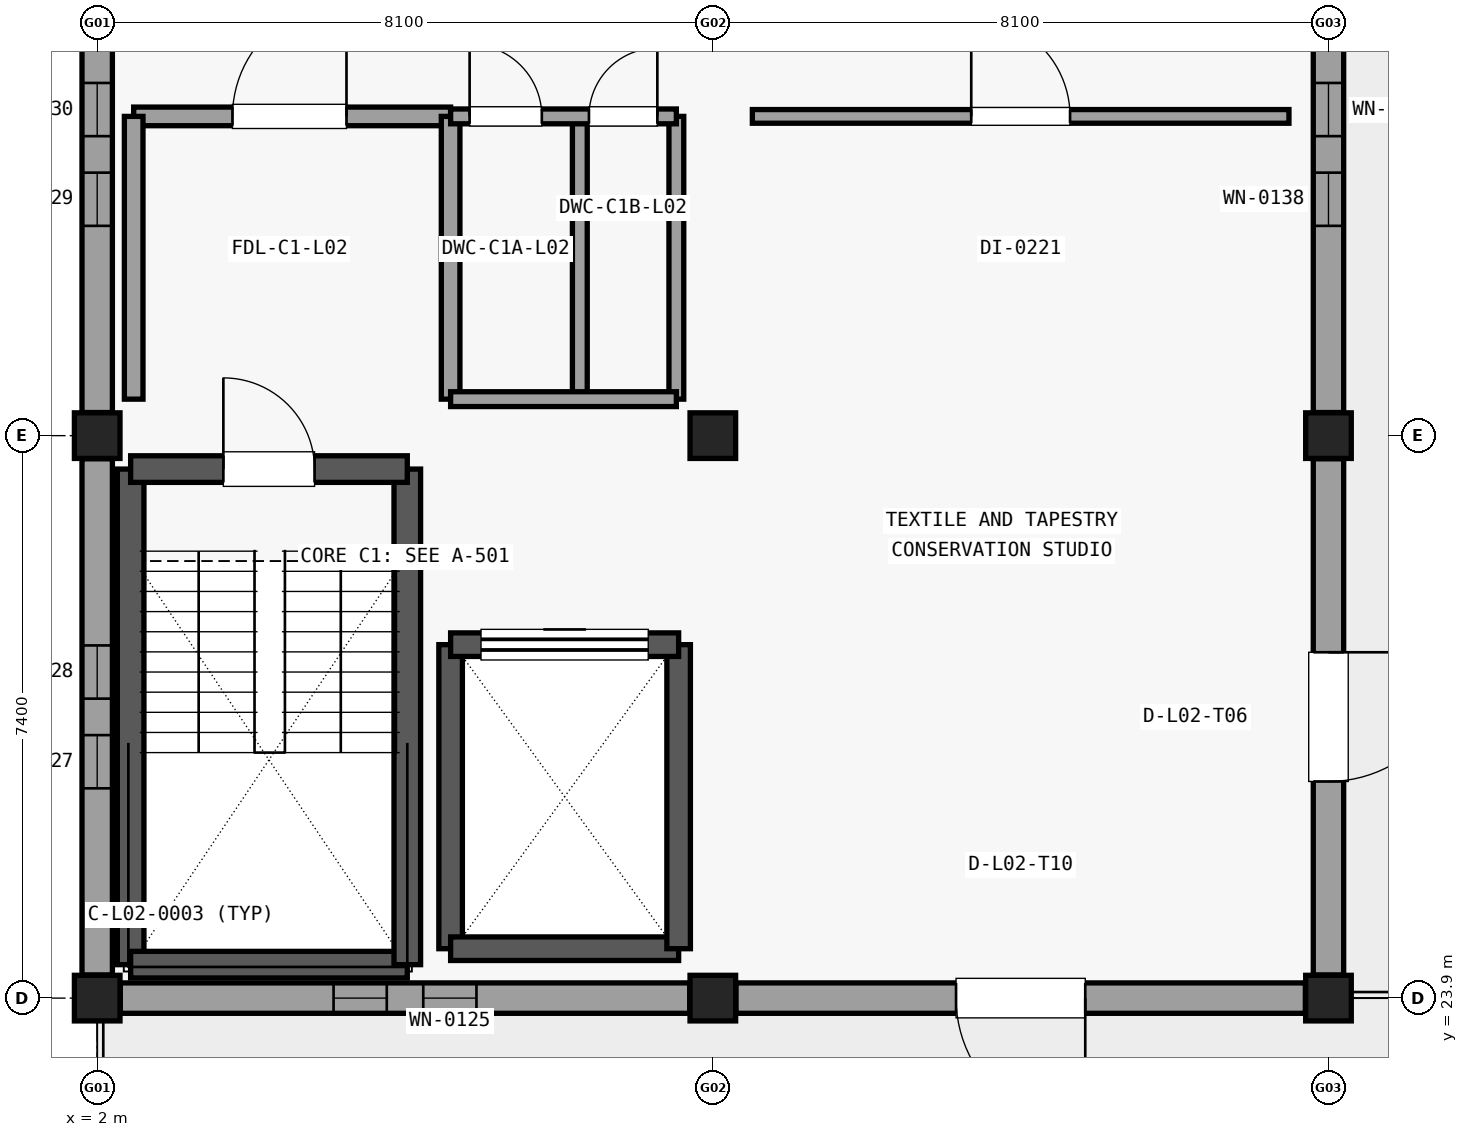
"""IFC4 building model, lengths in metres.
Left out: names, types, materials, properties, quantities, classifications, styles, units other than length and angle.
Written with IfcOpenShell. Run it as: python <this file> out.ifc"""

import sys

from ifc_helpers import new_model, si_unit, direction, frame, frame_2d, origin, origin_2d, place, context, subcontext, project, spatial, rectangle, extrude, element, fill, save


model = new_model("IFC4")
c1 = context("Model", 3, precision=1e-05, world=origin(), true_north=direction((0.0, 1.0)))
c2 = subcontext(c1, "Body", "Model", "MODEL_VIEW")
j1 = project(units=[si_unit("LENGTHUNIT", "METRE"), si_unit("PLANEANGLEUNIT", "RADIAN")], contexts=[c1])
p1 = place(None, origin())
s1 = spatial("IfcSite", under=j1, at=p1, CompositionType="ELEMENT")
p2 = place(p1, origin())
s2 = spatial("IfcBuilding", under=s1, at=p2, CompositionType="ELEMENT")
p3 = place(p2, frame((0.0, 0.0, 10.2)))
s3 = spatial("IfcBuildingStorey", under=s2, at=p3, CompositionType="ELEMENT", Elevation=10.2)
for number, where, z_axis, x_axis in (
    (1, (2.0, 23.9, 0.0), (0.0, 0.0, 1.0), (1.0, 0.0, 0.0)),
    (2, (2.0, 31.3, 0.0), (0.0, 0.0, 1.0), (1.0, 0.0, 0.0)),
    (3, (10.1, 23.9, 0.0), (0.0, 0.0, 1.0), (1.0, 0.0, 0.0)),
    (4, (10.1, 31.3, 0.0), (0.0, 0.0, 1.0), (1.0, 0.0, 0.0)),
    (5, (18.2, 23.9, 0.0), (0.0, 0.0, 1.0), (1.0, 0.0, 0.0)),
    (6, (18.2, 31.3, 0.0), (0.0, 0.0, 1.0), (1.0, 0.0, 0.0)),
):
    element("IfcColumn", number, at=place(p3, frame(where, z_axis=z_axis, x_axis=x_axis)), inside=s3, PredefinedType="COLUMN", context=c2, shape_type="SweptSolid", body=[
        extrude(rectangle(XDim=0.6, YDim=0.6, at=origin_2d()), origin(), (0.0, 0.0, 1.0), 3.37),
    ])
p4 = place(p3, frame((9.796, 23.9, 0.0), z_axis=(0.0, 0.0, 1.0), x_axis=(-1.0, 0.0, 0.0)))
e7 = element("IfcWall", 7, at=p4, inside=s3, PredefinedType="SOLIDWALL", context=c2, shape_type="SweptSolid", body=[
    extrude(rectangle(XDim=7.492, YDim=0.4, at=frame_2d((3.746, 0.0))), origin(), (0.0, 0.0, 1.0), 2.898),
])
p5 = place(p4, frame((2.806, 0.0, 0.6)))
e8 = element("IfcOpeningElement", 8, at=p5, cuts=e7, PredefinedType="OPENING", context=c2, shape_type="SweptSolid", body=[
    extrude(rectangle(XDim=0.7, YDim=1.86, at=frame_2d((0.35, 0.93))), frame((0.0, 0.21, 0.0), z_axis=(0.0, -1.0, 0.0), x_axis=(1.0, 0.0, 0.0)), (0.0, 0.0, 1.0), 0.42),
])
p6 = place(p4, frame((3.986, 0.0, 0.6)))
e9 = element("IfcOpeningElement", 9, at=p6, cuts=e7, PredefinedType="OPENING", context=c2, shape_type="SweptSolid", body=[
    extrude(rectangle(XDim=0.7, YDim=1.86, at=frame_2d((0.35, 0.93))), frame((0.0, 0.21, 0.0), z_axis=(0.0, -1.0, 0.0), x_axis=(1.0, 0.0, 0.0)), (0.0, 0.0, 1.0), 0.42),
])
p7 = place(p3, frame((2.0, 24.204, 0.0), z_axis=(0.0, 0.0, 1.0), x_axis=(0.0, 1.0, 0.0)))
e10 = element("IfcWall", 10, at=p7, inside=s3, PredefinedType="SOLIDWALL", context=c2, shape_type="SweptSolid", body=[
    extrude(rectangle(XDim=6.792, YDim=0.4, at=frame_2d((3.396, 0.0))), origin(), (0.0, 0.0, 1.0), 2.898),
])
p8 = place(p7, frame((2.456, 0.0, 0.6)))
e11 = element("IfcOpeningElement", 11, at=p8, cuts=e10, PredefinedType="OPENING", context=c2, shape_type="SweptSolid", body=[
    extrude(rectangle(XDim=0.7, YDim=1.86, at=frame_2d((0.35, 0.93))), frame((0.0, 0.21, 0.0), z_axis=(0.0, -1.0, 0.0), x_axis=(1.0, 0.0, 0.0)), (0.0, 0.0, 1.0), 0.42),
])
p9 = place(p7, frame((3.636, 0.0, 0.6)))
e12 = element("IfcOpeningElement", 12, at=p9, cuts=e10, PredefinedType="OPENING", context=c2, shape_type="SweptSolid", body=[
    extrude(rectangle(XDim=0.7, YDim=1.86, at=frame_2d((0.35, 0.93))), frame((0.0, 0.21, 0.0), z_axis=(0.0, -1.0, 0.0), x_axis=(1.0, 0.0, 0.0)), (0.0, 0.0, 1.0), 0.42),
])
p10 = place(p3, frame((2.0, 31.604, 0.0), z_axis=(0.0, 0.0, 1.0), x_axis=(0.0, 1.0, 0.0)))
e13 = element("IfcWall", 13, at=p10, inside=s3, PredefinedType="SOLIDWALL", context=c2, shape_type="SweptSolid", body=[
    extrude(rectangle(XDim=6.792, YDim=0.4, at=frame_2d((3.396, 0.0))), origin(), (0.0, 0.0, 1.0), 2.898),
])
p11 = place(p10, frame((2.456, 0.0, 0.6)))
e14 = element("IfcOpeningElement", 14, at=p11, cuts=e13, PredefinedType="OPENING", context=c2, shape_type="SweptSolid", body=[
    extrude(rectangle(XDim=0.7, YDim=1.86, at=frame_2d((0.35, 0.93))), frame((0.0, 0.21, 0.0), z_axis=(0.0, -1.0, 0.0), x_axis=(1.0, 0.0, 0.0)), (0.0, 0.0, 1.0), 0.42),
])
p12 = place(p10, frame((3.636, 0.0, 0.6)))
e15 = element("IfcOpeningElement", 15, at=p12, cuts=e13, PredefinedType="OPENING", context=c2, shape_type="SweptSolid", body=[
    extrude(rectangle(XDim=0.7, YDim=1.86, at=frame_2d((0.35, 0.93))), frame((0.0, 0.21, 0.0), z_axis=(0.0, -1.0, 0.0), x_axis=(1.0, 0.0, 0.0)), (0.0, 0.0, 1.0), 0.42),
])
p13 = place(p3, frame((17.896, 23.9, 0.0), z_axis=(0.0, 0.0, 1.0), x_axis=(-1.0, 0.0, 0.0)))
e16 = element("IfcWall", 16, at=p13, inside=s3, PredefinedType="SOLIDWALL", context=c2, shape_type="SweptSolid", body=[
    extrude(rectangle(XDim=7.492, YDim=0.4, at=frame_2d((3.746, 0.0))), origin(), (0.0, 0.0, 1.0), 2.898),
])
p14 = place(p13, frame((2.896, 0.0, 0.0)))
e17 = element("IfcOpeningElement", 17, at=p14, cuts=e16, PredefinedType="OPENING", context=c2, shape_type="SweptSolid", body=[
    extrude(rectangle(XDim=1.7, YDim=2.15, at=frame_2d((0.85, 1.075))), frame((0.0, 0.21, 0.0), z_axis=(0.0, -1.0, 0.0), x_axis=(1.0, 0.0, 0.0)), (0.0, 0.0, 1.0), 0.42),
])
p15 = place(p3, frame((18.2, 30.996, 0.0), z_axis=(0.0, 0.0, 1.0), x_axis=(0.0, -1.0, 0.0)))
e18 = element("IfcWall", 18, at=p15, inside=s3, PredefinedType="SOLIDWALL", context=c2, shape_type="SweptSolid", body=[
    extrude(rectangle(XDim=6.792, YDim=0.4, at=frame_2d((3.396, 0.0))), origin(), (0.0, 0.0, 1.0), 2.898),
])
p16 = place(p15, frame((2.546, 0.0, 0.0)))
e19 = element("IfcOpeningElement", 19, at=p16, cuts=e18, PredefinedType="OPENING", context=c2, shape_type="SweptSolid", body=[
    extrude(rectangle(XDim=1.7, YDim=2.15, at=frame_2d((0.85, 1.075))), frame((0.0, 0.21, 0.0), z_axis=(0.0, -1.0, 0.0), x_axis=(1.0, 0.0, 0.0)), (0.0, 0.0, 1.0), 0.42),
])
p17 = place(p3, frame((18.2, 38.396, 0.0), z_axis=(0.0, 0.0, 1.0), x_axis=(0.0, -1.0, 0.0)))
e20 = element("IfcWall", 20, at=p17, inside=s3, PredefinedType="SOLIDWALL", context=c2, shape_type="SweptSolid", body=[
    extrude(rectangle(XDim=6.792, YDim=0.4, at=frame_2d((3.396, 0.0))), origin(), (0.0, 0.0, 1.0), 2.898),
])
p18 = place(p17, frame((2.456, 0.0, 0.6)))
e21 = element("IfcOpeningElement", 21, at=p18, cuts=e20, PredefinedType="OPENING", context=c2, shape_type="SweptSolid", body=[
    extrude(rectangle(XDim=0.7, YDim=1.86, at=frame_2d((0.35, 0.93))), frame((0.0, 0.21, 0.0), z_axis=(0.0, -1.0, 0.0), x_axis=(1.0, 0.0, 0.0)), (0.0, 0.0, 1.0), 0.42),
])
p19 = place(p17, frame((3.636, 0.0, 0.6)))
e22 = element("IfcOpeningElement", 22, at=p19, cuts=e20, PredefinedType="OPENING", context=c2, shape_type="SweptSolid", body=[
    extrude(rectangle(XDim=0.7, YDim=1.86, at=frame_2d((0.35, 0.93))), frame((0.0, 0.21, 0.0), z_axis=(0.0, -1.0, 0.0), x_axis=(1.0, 0.0, 0.0)), (0.0, 0.0, 1.0), 0.42),
])
p20 = place(p3, frame((2.44, 24.34, 0.0), z_axis=(0.0, 0.0, 1.0), x_axis=(0.0, 1.0, 0.0)))
e23 = element("IfcWall", 23, at=p20, inside=s3, PredefinedType="SHEAR", context=c2, shape_type="SweptSolid", body=[
    extrude(rectangle(XDim=6.52, YDim=0.35, at=frame_2d((3.26, 0.0))), origin(), (0.0, 0.0, 1.0), 3.365),
])
p21 = place(p3, frame((2.44, 24.34, 0.0), z_axis=(0.0, 0.0, 1.0), x_axis=(1.0, 0.0, 0.0)))
e24 = element("IfcWall", 24, at=p21, inside=s3, PredefinedType="SHEAR", context=c2, shape_type="SweptSolid", body=[
    extrude(rectangle(XDim=3.64, YDim=0.35, at=frame_2d((1.82, 0.0))), origin(), (0.0, 0.0, 1.0), 3.365),
])
p22 = place(p3, frame((6.08, 24.34, 0.0), z_axis=(0.0, 0.0, 1.0), x_axis=(0.0, 1.0, 0.0)))
e25 = element("IfcWall", 25, at=p22, inside=s3, PredefinedType="SHEAR", context=c2, shape_type="SweptSolid", body=[
    extrude(rectangle(XDim=6.52, YDim=0.35, at=frame_2d((3.26, 0.0))), origin(), (0.0, 0.0, 1.0), 3.365),
])
p23 = place(p3, frame((2.44, 30.86, 0.0), z_axis=(0.0, 0.0, 1.0), x_axis=(1.0, 0.0, 0.0)))
e26 = element("IfcWall", 26, at=p23, inside=s3, PredefinedType="SHEAR", context=c2, shape_type="SweptSolid", body=[
    extrude(rectangle(XDim=3.64, YDim=0.35, at=frame_2d((1.82, 0.0))), origin(), (0.0, 0.0, 1.0), 3.365),
])
p24 = place(p23, frame((1.22, 0.0, 0.0)))
e27 = element("IfcOpeningElement", 27, at=p24, cuts=e26, PredefinedType="OPENING", context=c2, shape_type="SweptSolid", body=[
    extrude(rectangle(XDim=1.2, YDim=2.15, at=frame_2d((0.6, 1.075))), frame((0.0, 0.185, 0.0), z_axis=(0.0, -1.0, 0.0), x_axis=(1.0, 0.0, 0.0)), (0.0, 0.0, 1.0), 0.37),
])
p25 = place(p3, frame((6.65, 24.55, 0.0), z_axis=(0.0, 0.0, 1.0), x_axis=(0.0, 1.0, 0.0)))
e28 = element("IfcWall", 28, at=p25, inside=s3, PredefinedType="SHEAR", context=c2, shape_type="SweptSolid", body=[
    extrude(rectangle(XDim=4.0, YDim=0.31, at=frame_2d((2.0, 0.0))), origin(), (0.0, 0.0, 1.0), 3.365),
])
p26 = place(p3, frame((6.65, 24.55, 0.0), z_axis=(0.0, 0.0, 1.0), x_axis=(1.0, 0.0, 0.0)))
e29 = element("IfcWall", 29, at=p26, inside=s3, PredefinedType="SHEAR", context=c2, shape_type="SweptSolid", body=[
    extrude(rectangle(XDim=3.0, YDim=0.31, at=frame_2d((1.5, 0.0))), origin(), (0.0, 0.0, 1.0), 3.365),
])
p27 = place(p3, frame((9.65, 24.55, 0.0), z_axis=(0.0, 0.0, 1.0), x_axis=(0.0, 1.0, 0.0)))
e30 = element("IfcWall", 30, at=p27, inside=s3, PredefinedType="SHEAR", context=c2, shape_type="SweptSolid", body=[
    extrude(rectangle(XDim=4.0, YDim=0.31, at=frame_2d((2.0, 0.0))), origin(), (0.0, 0.0, 1.0), 3.365),
])
p28 = place(p3, frame((6.65, 28.55, 0.0), z_axis=(0.0, 0.0, 1.0), x_axis=(1.0, 0.0, 0.0)))
e31 = element("IfcWall", 31, at=p28, inside=s3, PredefinedType="SHEAR", context=c2, shape_type="SweptSolid", body=[
    extrude(rectangle(XDim=3.0, YDim=0.31, at=frame_2d((1.5, 0.0))), origin(), (0.0, 0.0, 1.0), 3.365),
])
p29 = place(p28, frame((0.4, 0.0, 0.0)))
e32 = element("IfcOpeningElement", 32, at=p29, cuts=e31, PredefinedType="OPENING", context=c2, shape_type="SweptSolid", body=[
    extrude(rectangle(XDim=2.2, YDim=2.55, at=frame_2d((1.1, 1.275))), frame((0.0, 0.165, 0.0), z_axis=(0.0, -1.0, 0.0), x_axis=(1.0, 0.0, 0.0)), (0.0, 0.0, 1.0), 0.33),
])
p30 = place(p3, frame((2.48, 35.5, 0.0), z_axis=(0.0, 0.0, 1.0), x_axis=(1.0, 0.0, 0.0)))
e33 = element("IfcWall", 33, at=p30, inside=s3, PredefinedType="PARTITIONING", context=c2, shape_type="SweptSolid", body=[
    extrude(rectangle(XDim=4.17, YDim=0.245, at=frame_2d((2.085, 0.0))), origin(), (0.0, 0.0, 1.0), 2.903),
])
p31 = place(p30, frame((1.3, 0.0, 0.0)))
e34 = element("IfcOpeningElement", 34, at=p31, cuts=e33, PredefinedType="OPENING", context=c2, shape_type="SweptSolid", body=[
    extrude(rectangle(XDim=1.5, YDim=2.15, at=frame_2d((0.75, 1.075))), frame((0.0, 0.133, 0.0), z_axis=(0.0, -1.0, 0.0), x_axis=(1.0, 0.0, 0.0)), (0.0, 0.0, 1.0), 0.265),
])
for number, where, z_axis, x_axis in (
    (35, (2.48, 31.78, 0.0), (0.0, 0.0, 1.0), (0.0, 1.0, 0.0)),
    (36, (6.65, 31.78, 0.0), (0.0, 0.0, 1.0), (0.0, 1.0, 0.0)),
):
    element("IfcWall", number, at=place(p3, frame(where, z_axis=z_axis, x_axis=x_axis)), inside=s3, PredefinedType="PARTITIONING", context=c2, shape_type="SweptSolid", body=[
        extrude(rectangle(XDim=3.72, YDim=0.245, at=frame_2d((1.86, 0.0))), origin(), (0.0, 0.0, 1.0), 2.903),
    ])
for number, where, z_axis, x_axis in (
    (37, (8.35, 31.78, 0.0), (0.0, 0.0, 1.0), (0.0, 1.0, 0.0)),
    (38, (9.62, 31.78, 0.0), (0.0, 0.0, 1.0), (0.0, 1.0, 0.0)),
):
    element("IfcWall", number, at=place(p3, frame(where, z_axis=z_axis, x_axis=x_axis)), inside=s3, PredefinedType="PARTITIONING", context=c2, shape_type="SweptSolid", body=[
        extrude(rectangle(XDim=3.72, YDim=0.195, at=frame_2d((1.86, 0.0))), origin(), (0.0, 0.0, 1.0), 2.903),
    ])
p32 = place(p3, frame((6.65, 31.78, 0.0), z_axis=(0.0, 0.0, 1.0), x_axis=(1.0, 0.0, 0.0)))
e39 = element("IfcWall", 39, at=p32, inside=s3, PredefinedType="PARTITIONING", context=c2, shape_type="SweptSolid", body=[
    extrude(rectangle(XDim=2.97, YDim=0.195, at=frame_2d((1.485, 0.0))), origin(), (0.0, 0.0, 1.0), 2.903),
])
p33 = place(p3, frame((6.65, 35.5, 0.0), z_axis=(0.0, 0.0, 1.0), x_axis=(1.0, 0.0, 0.0)))
e40 = element("IfcWall", 40, at=p33, inside=s3, PredefinedType="PARTITIONING", context=c2, shape_type="SweptSolid", body=[
    extrude(rectangle(XDim=2.97, YDim=0.195, at=frame_2d((1.485, 0.0))), origin(), (0.0, 0.0, 1.0), 2.903),
])
p34 = place(p33, frame((0.25, 0.0, 0.0)))
e41 = element("IfcOpeningElement", 41, at=p34, cuts=e40, PredefinedType="OPENING", context=c2, shape_type="SweptSolid", body=[
    extrude(rectangle(XDim=0.95, YDim=2.1, at=frame_2d((0.475, 1.05))), frame((0.0, 0.107, 0.0), z_axis=(0.0, -1.0, 0.0), x_axis=(1.0, 0.0, 0.0)), (0.0, 0.0, 1.0), 0.215),
])
p35 = place(p33, frame((1.82, 0.0, 0.0)))
e42 = element("IfcOpeningElement", 42, at=p35, cuts=e40, PredefinedType="OPENING", context=c2, shape_type="SweptSolid", body=[
    extrude(rectangle(XDim=0.9, YDim=2.1, at=frame_2d((0.45, 1.05))), frame((0.0, 0.107, 0.0), z_axis=(0.0, -1.0, 0.0), x_axis=(1.0, 0.0, 0.0)), (0.0, 0.0, 1.0), 0.215),
])
p36 = place(p3, frame((10.62, 35.5, 0.0), z_axis=(0.0, 0.0, 1.0), x_axis=(1.0, 0.0, 0.0)))
e43 = element("IfcWall", 43, at=p36, inside=s3, PredefinedType="PARTITIONING", context=c2, shape_type="SweptSolid", body=[
    extrude(rectangle(XDim=7.06, YDim=0.18, at=frame_2d((3.53, 0.0))), origin(), (0.0, 0.0, 1.0), 2.903),
])
p37 = place(p36, frame((2.88, 0.0, 0.0)))
e44 = element("IfcOpeningElement", 44, at=p37, cuts=e43, PredefinedType="OPENING", context=c2, shape_type="SweptSolid", body=[
    extrude(rectangle(XDim=1.3, YDim=2.2, at=frame_2d((0.65, 1.1))), frame((0.0, 0.1, 0.0), z_axis=(0.0, -1.0, 0.0), x_axis=(1.0, 0.0, 0.0)), (0.0, 0.0, 1.0), 0.2),
])
p38 = place(p5, origin())
e45 = element("IfcWindow", 45, at=p38, inside=s3, PartitioningType="SINGLE_PANEL", PredefinedType="WINDOW", context=c2, shape_type="SweptSolid", body=[
    extrude(rectangle(XDim=0.7, YDim=1.86, at=frame_2d((0.35, 0.93))), frame((0.0, 0.03, 0.0), z_axis=(0.0, -1.0, 0.0), x_axis=(1.0, 0.0, 0.0)), (0.0, 0.0, 1.0), 0.06),
])
fill(e8, e45)
p39 = place(p6, origin())
e46 = element("IfcWindow", 46, at=p39, inside=s3, PartitioningType="SINGLE_PANEL", PredefinedType="WINDOW", context=c2, shape_type="SweptSolid", body=[
    extrude(rectangle(XDim=0.7, YDim=1.86, at=frame_2d((0.35, 0.93))), frame((0.0, 0.03, 0.0), z_axis=(0.0, -1.0, 0.0), x_axis=(1.0, 0.0, 0.0)), (0.0, 0.0, 1.0), 0.06),
])
fill(e9, e46)
p40 = place(p8, origin())
e47 = element("IfcWindow", 47, at=p40, inside=s3, PartitioningType="SINGLE_PANEL", PredefinedType="WINDOW", context=c2, shape_type="SweptSolid", body=[
    extrude(rectangle(XDim=0.7, YDim=1.86, at=frame_2d((0.35, 0.93))), frame((0.0, 0.03, 0.0), z_axis=(0.0, -1.0, 0.0), x_axis=(1.0, 0.0, 0.0)), (0.0, 0.0, 1.0), 0.06),
])
fill(e11, e47)
p41 = place(p9, origin())
e48 = element("IfcWindow", 48, at=p41, inside=s3, PartitioningType="SINGLE_PANEL", PredefinedType="WINDOW", context=c2, shape_type="SweptSolid", body=[
    extrude(rectangle(XDim=0.7, YDim=1.86, at=frame_2d((0.35, 0.93))), frame((0.0, 0.03, 0.0), z_axis=(0.0, -1.0, 0.0), x_axis=(1.0, 0.0, 0.0)), (0.0, 0.0, 1.0), 0.06),
])
fill(e12, e48)
p42 = place(p11, origin())
e49 = element("IfcWindow", 49, at=p42, inside=s3, PartitioningType="SINGLE_PANEL", PredefinedType="WINDOW", context=c2, shape_type="SweptSolid", body=[
    extrude(rectangle(XDim=0.7, YDim=1.86, at=frame_2d((0.35, 0.93))), frame((0.0, 0.03, 0.0), z_axis=(0.0, -1.0, 0.0), x_axis=(1.0, 0.0, 0.0)), (0.0, 0.0, 1.0), 0.06),
])
fill(e14, e49)
p43 = place(p12, origin())
e50 = element("IfcWindow", 50, at=p43, inside=s3, PartitioningType="SINGLE_PANEL", PredefinedType="WINDOW", context=c2, shape_type="SweptSolid", body=[
    extrude(rectangle(XDim=0.7, YDim=1.86, at=frame_2d((0.35, 0.93))), frame((0.0, 0.03, 0.0), z_axis=(0.0, -1.0, 0.0), x_axis=(1.0, 0.0, 0.0)), (0.0, 0.0, 1.0), 0.06),
])
fill(e15, e50)
p44 = place(p14, origin())
e51 = element("IfcDoor", 51, at=p44, inside=s3, OperationType="SINGLE_SWING_LEFT", PredefinedType="DOOR", context=c2, shape_type="SweptSolid", body=[
    extrude(rectangle(XDim=1.7, YDim=2.15, at=frame_2d((0.85, 1.075))), frame((0.0, 0.025, 0.0), z_axis=(0.0, -1.0, 0.0), x_axis=(1.0, 0.0, 0.0)), (0.0, 0.0, 1.0), 0.05),
])
fill(e17, e51)
p45 = place(p16, origin())
e52 = element("IfcDoor", 52, at=p45, inside=s3, OperationType="SINGLE_SWING_LEFT", PredefinedType="DOOR", context=c2, shape_type="SweptSolid", body=[
    extrude(rectangle(XDim=1.7, YDim=2.15, at=frame_2d((0.85, 1.075))), frame((0.0, 0.025, 0.0), z_axis=(0.0, -1.0, 0.0), x_axis=(1.0, 0.0, 0.0)), (0.0, 0.0, 1.0), 0.05),
])
fill(e19, e52)
p46 = place(p18, origin())
e53 = element("IfcWindow", 53, at=p46, inside=s3, PartitioningType="SINGLE_PANEL", PredefinedType="WINDOW", context=c2, shape_type="SweptSolid", body=[
    extrude(rectangle(XDim=0.7, YDim=1.86, at=frame_2d((0.35, 0.93))), frame((0.0, 0.03, 0.0), z_axis=(0.0, -1.0, 0.0), x_axis=(1.0, 0.0, 0.0)), (0.0, 0.0, 1.0), 0.06),
])
fill(e21, e53)
p47 = place(p19, origin())
e54 = element("IfcWindow", 54, at=p47, inside=s3, PartitioningType="SINGLE_PANEL", PredefinedType="WINDOW", context=c2, shape_type="SweptSolid", body=[
    extrude(rectangle(XDim=0.7, YDim=1.86, at=frame_2d((0.35, 0.93))), frame((0.0, 0.03, 0.0), z_axis=(0.0, -1.0, 0.0), x_axis=(1.0, 0.0, 0.0)), (0.0, 0.0, 1.0), 0.06),
])
fill(e22, e54)
p48 = place(p24, origin())
e55 = element("IfcDoor", 55, at=p48, inside=s3, OperationType="SINGLE_SWING_LEFT", PredefinedType="DOOR", context=c2, shape_type="SweptSolid", body=[
    extrude(rectangle(XDim=1.2, YDim=2.15, at=frame_2d((0.6, 1.075))), frame((0.0, 0.025, 0.0), z_axis=(0.0, -1.0, 0.0), x_axis=(1.0, 0.0, 0.0)), (0.0, 0.0, 1.0), 0.05),
])
fill(e27, e55)
p49 = place(p29, origin())
e56 = element("IfcDoor", 56, at=p49, inside=s3, OperationType="SLIDING_TO_RIGHT", PredefinedType="DOOR", context=c2, shape_type="SweptSolid", body=[
    extrude(rectangle(XDim=2.2, YDim=2.55, at=frame_2d((1.1, 1.275))), frame((0.0, 0.025, 0.0), z_axis=(0.0, -1.0, 0.0), x_axis=(1.0, 0.0, 0.0)), (0.0, 0.0, 1.0), 0.05),
])
fill(e32, e56)
p50 = place(p31, origin())
e57 = element("IfcDoor", 57, at=p50, inside=s3, OperationType="SINGLE_SWING_RIGHT", PredefinedType="DOOR", context=c2, shape_type="SweptSolid", body=[
    extrude(rectangle(XDim=1.5, YDim=2.15, at=frame_2d((0.75, 1.075))), frame((0.0, 0.025, 0.0), z_axis=(0.0, -1.0, 0.0), x_axis=(1.0, 0.0, 0.0)), (0.0, 0.0, 1.0), 0.05),
])
fill(e34, e57)
p51 = place(p34, origin())
e58 = element("IfcDoor", 58, at=p51, inside=s3, OperationType="SINGLE_SWING_LEFT", PredefinedType="DOOR", context=c2, shape_type="SweptSolid", body=[
    extrude(rectangle(XDim=0.95, YDim=2.1, at=frame_2d((0.475, 1.05))), frame((0.0, 0.025, 0.0), z_axis=(0.0, -1.0, 0.0), x_axis=(1.0, 0.0, 0.0)), (0.0, 0.0, 1.0), 0.05),
])
fill(e41, e58)
p52 = place(p35, origin())
e59 = element("IfcDoor", 59, at=p52, inside=s3, OperationType="SINGLE_SWING_RIGHT", PredefinedType="DOOR", context=c2, shape_type="SweptSolid", body=[
    extrude(rectangle(XDim=0.9, YDim=2.1, at=frame_2d((0.45, 1.05))), frame((0.0, 0.025, 0.0), z_axis=(0.0, -1.0, 0.0), x_axis=(1.0, 0.0, 0.0)), (0.0, 0.0, 1.0), 0.05),
])
fill(e42, e59)
p53 = place(p37, origin())
e60 = element("IfcDoor", 60, at=p53, inside=s3, OperationType="SINGLE_SWING_LEFT", PredefinedType="DOOR", context=c2, shape_type="SweptSolid", body=[
    extrude(rectangle(XDim=1.3, YDim=2.2, at=frame_2d((0.65, 1.1))), frame((0.0, 0.025, 0.0), z_axis=(0.0, -1.0, 0.0), x_axis=(1.0, 0.0, 0.0)), (0.0, 0.0, 1.0), 0.05),
])
fill(e44, e60)
save(model, sys.argv[1])
